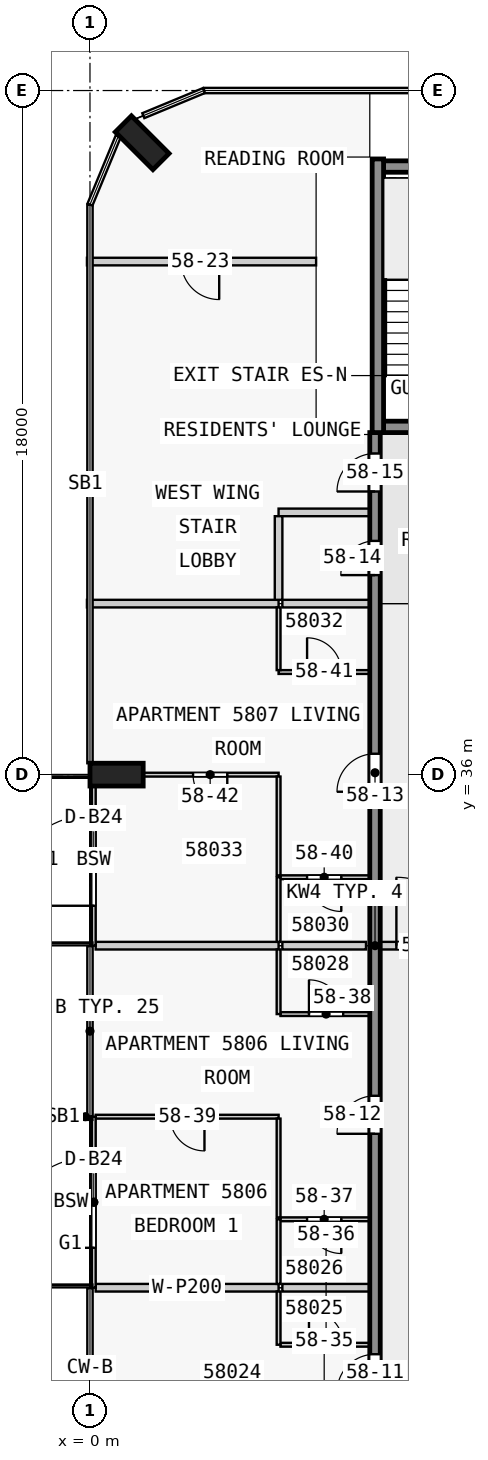
"""IFC4 building model, lengths in metres.
Left out: names, types, materials, properties, quantities, classifications, styles, units other than length and angle.
Written with IfcOpenShell. Run it as: python <this file> out.ifc"""

import sys

from ifc_helpers import new_model, si_unit, direction, frame, frame_2d, origin, origin_2d, place, context, subcontext, project, spatial, rectangle, extrude, element, fill, save


model = new_model("IFC4")
c1 = context("Model", 3, precision=1e-05, world=origin(), true_north=direction((0.0, 1.0)))
c2 = subcontext(c1, "Body", "Model", "MODEL_VIEW")
j1 = project(units=[si_unit("LENGTHUNIT", "METRE"), si_unit("PLANEANGLEUNIT", "RADIAN")], contexts=[c1])
p1 = place(None, origin())
s1 = spatial("IfcSite", under=j1, at=p1, CompositionType="ELEMENT")
p2 = place(p1, origin())
s2 = spatial("IfcBuilding", under=s1, at=p2, CompositionType="ELEMENT")
p3 = place(p2, frame((0.0, 0.0, 222.4)))
s3 = spatial("IfcBuildingStorey", under=s2, at=p3, CompositionType="ELEMENT", Elevation=222.4)
for number, where, z_axis, x_axis in (
    (1, (1.374, 52.626, 0.0), (0.0, 0.0, 1.0), (0.707, 0.707, 0.0)),
    (2, (0.7, 36.0, 0.0), (0.0, 0.0, 1.0), (0.0, 1.0, 0.0)),
):
    element("IfcColumn", number, at=place(p3, frame(where, z_axis=z_axis, x_axis=x_axis)), inside=s3, PredefinedType="COLUMN", context=c2, shape_type="SweptSolid", body=[
        extrude(rectangle(XDim=0.6, YDim=1.4, at=origin_2d()), origin(), (0.0, 0.0, 1.0), 3.5),
    ])
p4 = place(p3, frame((7.725, 45.15, 0.0), z_axis=(0.0, 0.0, 1.0), x_axis=(1.0, 0.0, 0.0)))
e3 = element("IfcWall", 3, at=p4, inside=s3, PredefinedType="SHEAR", context=c2, shape_type="SweptSolid", body=[
    extrude(rectangle(XDim=2.55, YDim=0.3, at=frame_2d((1.275, 0.0))), origin(), (0.0, 0.0, 1.0), 3.5),
])
p5 = place(p4, frame((0.725, 0.0, 0.0)))
e4 = element("IfcOpeningElement", 4, at=p5, cuts=e3, PredefinedType="OPENING", context=c2, shape_type="SweptSolid", body=[
    extrude(rectangle(XDim=1.1, YDim=2.1, at=frame_2d((0.55, 1.05))), frame((0.0, 0.16, 0.0), z_axis=(0.0, -1.0, 0.0), x_axis=(1.0, 0.0, 0.0)), (0.0, 0.0, 1.0), 0.32),
])
p6 = place(p3, frame((7.725, 52.0, 0.0), z_axis=(0.0, 0.0, 1.0), x_axis=(1.0, 0.0, 0.0)))
e5 = element("IfcWall", 5, at=p6, inside=s3, PredefinedType="SHEAR", context=c2, shape_type="SweptSolid", body=[
    extrude(rectangle(XDim=2.55, YDim=0.3, at=frame_2d((1.275, 0.0))), origin(), (0.0, 0.0, 1.0), 3.5),
])
p7 = place(p3, frame((7.575, 45.0, 0.0), z_axis=(0.0, 0.0, 1.0), x_axis=(0.0, 1.0, 0.0)))
e6 = element("IfcWall", 6, at=p7, inside=s3, PredefinedType="SHEAR", context=c2, shape_type="SweptSolid", body=[
    extrude(rectangle(XDim=7.2, YDim=0.3, at=frame_2d((3.6, 0.0))), origin(), (0.0, 0.0, 1.0), 3.5),
])
p8 = place(p3, frame((7.5, 18.0, 0.0), z_axis=(0.0, 0.0, 1.0), x_axis=(0.0, 1.0, 0.0)))
e7 = element("IfcWall", 7, at=p8, inside=s3, PredefinedType="SHEAR", context=c2, shape_type="SweptSolid", body=[
    extrude(rectangle(XDim=27.0, YDim=0.275, at=frame_2d((13.5, 0.0))), origin(), (0.0, 0.0, 1.0), 3.25),
])
p9 = place(p8, frame((1.75, 0.0, 0.0)))
e8 = element("IfcOpeningElement", 8, at=p9, cuts=e7, PredefinedType="OPENING", context=c2, shape_type="SweptSolid", body=[
    extrude(rectangle(XDim=1.0, YDim=2.1, at=frame_2d((0.5, 1.05))), frame((0.0, 0.147, 0.0), z_axis=(0.0, -1.0, 0.0), x_axis=(1.0, 0.0, 0.0)), (0.0, 0.0, 1.0), 0.295),
])
p10 = place(p8, frame((8.55, 0.0, 0.0)))
e9 = element("IfcOpeningElement", 9, at=p10, cuts=e7, PredefinedType="OPENING", context=c2, shape_type="SweptSolid", body=[
    extrude(rectangle(XDim=1.0, YDim=2.1, at=frame_2d((0.5, 1.05))), frame((0.0, 0.147, 0.0), z_axis=(0.0, -1.0, 0.0), x_axis=(1.0, 0.0, 0.0)), (0.0, 0.0, 1.0), 0.295),
])
p11 = place(p8, frame((17.55, 0.0, 0.0)))
e10 = element("IfcOpeningElement", 10, at=p11, cuts=e7, PredefinedType="OPENING", context=c2, shape_type="SweptSolid", body=[
    extrude(rectangle(XDim=1.0, YDim=2.1, at=frame_2d((0.5, 1.05))), frame((0.0, 0.147, 0.0), z_axis=(0.0, -1.0, 0.0), x_axis=(1.0, 0.0, 0.0)), (0.0, 0.0, 1.0), 0.295),
])
p12 = place(p8, frame((23.25, 0.0, 0.0)))
e11 = element("IfcOpeningElement", 11, at=p12, cuts=e7, PredefinedType="OPENING", context=c2, shape_type="SweptSolid", body=[
    extrude(rectangle(XDim=0.9, YDim=2.1, at=frame_2d((0.45, 1.05))), frame((0.0, 0.147, 0.0), z_axis=(0.0, -1.0, 0.0), x_axis=(1.0, 0.0, 0.0)), (0.0, 0.0, 1.0), 0.295),
])
p13 = place(p8, frame((25.45, 0.0, 0.0)))
e12 = element("IfcOpeningElement", 12, at=p13, cuts=e7, PredefinedType="OPENING", context=c2, shape_type="SweptSolid", body=[
    extrude(rectangle(XDim=1.0, YDim=2.1, at=frame_2d((0.5, 1.05))), frame((0.0, 0.147, 0.0), z_axis=(0.0, -1.0, 0.0), x_axis=(1.0, 0.0, 0.0)), (0.0, 0.0, 1.0), 0.295),
])
p14 = place(p3, frame((0.1, 22.5, 0.0), z_axis=(0.0, 0.0, 1.0), x_axis=(0.0, 1.0, 0.0)))
e13 = element("IfcWall", 13, at=p14, inside=s3, PredefinedType="STANDARD", context=c2, shape_type="SweptSolid", body=[
    extrude(rectangle(XDim=4.5, YDim=0.1, at=frame_2d((2.25, 0.0))), origin(), (0.0, 0.0, 1.0), 3.25),
])
p15 = place(p14, frame((1.05, 0.0, 0.0)))
e14 = element("IfcOpeningElement", 14, at=p15, cuts=e13, PredefinedType="OPENING", context=c2, shape_type="SweptSolid", body=[
    extrude(rectangle(XDim=2.4, YDim=2.4, at=frame_2d((1.2, 1.2))), frame((0.0, 0.06, 0.0), z_axis=(0.0, -1.0, 0.0), x_axis=(1.0, 0.0, 0.0)), (0.0, 0.0, 1.0), 0.12),
])
p16 = place(p3, frame((0.1, 31.5, 0.0), z_axis=(0.0, 0.0, 1.0), x_axis=(0.0, 1.0, 0.0)))
e15 = element("IfcWall", 15, at=p16, inside=s3, PredefinedType="STANDARD", context=c2, shape_type="SweptSolid", body=[
    extrude(rectangle(XDim=4.5, YDim=0.1, at=frame_2d((2.25, 0.0))), origin(), (0.0, 0.0, 1.0), 3.25),
])
p17 = place(p16, frame((1.05, 0.0, 0.0)))
e16 = element("IfcOpeningElement", 16, at=p17, cuts=e15, PredefinedType="OPENING", context=c2, shape_type="SweptSolid", body=[
    extrude(rectangle(XDim=2.4, YDim=2.4, at=frame_2d((1.2, 1.2))), frame((0.0, 0.06, 0.0), z_axis=(0.0, -1.0, 0.0), x_axis=(1.0, 0.0, 0.0)), (0.0, 0.0, 1.0), 0.12),
])
p18 = place(p3, frame((5.012, 21.0, 0.0), z_axis=(0.0, 0.0, 1.0), x_axis=(1.0, 0.0, 0.0)))
e17 = element("IfcWall", 17, at=p18, inside=s3, PredefinedType="PARTITIONING", context=c2, shape_type="SweptSolid", body=[
    extrude(rectangle(XDim=2.35, YDim=0.1, at=frame_2d((1.175, 0.0))), origin(), (0.0, 0.0, 1.0), 3.25),
])
p19 = place(p18, frame((0.75, 0.0, 0.0)))
e18 = element("IfcOpeningElement", 18, at=p19, cuts=e17, PredefinedType="OPENING", context=c2, shape_type="SweptSolid", body=[
    extrude(rectangle(XDim=0.9, YDim=2.1, at=frame_2d((0.45, 1.05))), frame((0.0, 0.06, 0.0), z_axis=(0.0, -1.0, 0.0), x_axis=(1.0, 0.0, 0.0)), (0.0, 0.0, 1.0), 0.12),
])
p20 = place(p3, frame((7.363, 22.5, 0.0), z_axis=(0.0, 0.0, 1.0), x_axis=(-1.0, 0.0, 0.0)))
e19 = element("IfcWall", 19, at=p20, inside=s3, PredefinedType="PARTITIONING", context=c2, shape_type="SweptSolid", body=[
    extrude(rectangle(XDim=2.3, YDim=0.2, at=frame_2d((1.15, 0.0))), origin(), (0.0, 0.0, 1.0), 3.25),
])
p21 = place(p3, frame((0.15, 22.5, 0.0), z_axis=(0.0, 0.0, 1.0), x_axis=(1.0, 0.0, 0.0)))
e20 = element("IfcWall", 20, at=p21, inside=s3, PredefinedType="PARTITIONING", context=c2, shape_type="SweptSolid", body=[
    extrude(rectangle(XDim=4.812, YDim=0.2, at=frame_2d((2.406, 0.0))), origin(), (0.0, 0.0, 1.0), 3.25),
])
p22 = place(p3, frame((7.363, 24.3, 0.0), z_axis=(0.0, 0.0, 1.0), x_axis=(-1.0, 0.0, 0.0)))
e21 = element("IfcWall", 21, at=p22, inside=s3, PredefinedType="PARTITIONING", context=c2, shape_type="SweptSolid", body=[
    extrude(rectangle(XDim=2.35, YDim=0.1, at=frame_2d((1.175, 0.0))), origin(), (0.0, 0.0, 1.0), 3.25),
])
p23 = place(p22, frame((0.75, 0.0, 0.0)))
e22 = element("IfcOpeningElement", 22, at=p23, cuts=e21, PredefinedType="OPENING", context=c2, shape_type="SweptSolid", body=[
    extrude(rectangle(XDim=0.9, YDim=2.1, at=frame_2d((0.45, 1.05))), frame((0.0, 0.06, 0.0), z_axis=(0.0, -1.0, 0.0), x_axis=(1.0, 0.0, 0.0)), (0.0, 0.0, 1.0), 0.12),
])
p24 = place(p3, frame((4.962, 27.0, 0.0), z_axis=(0.0, 0.0, 1.0), x_axis=(-1.0, 0.0, 0.0)))
e23 = element("IfcWall", 23, at=p24, inside=s3, PredefinedType="PARTITIONING", context=c2, shape_type="SweptSolid", body=[
    extrude(rectangle(XDim=4.812, YDim=0.1, at=frame_2d((2.406, 0.0))), origin(), (0.0, 0.0, 1.0), 3.25),
])
p25 = place(p24, frame((1.95, 0.0, 0.0)))
e24 = element("IfcOpeningElement", 24, at=p25, cuts=e23, PredefinedType="OPENING", context=c2, shape_type="SweptSolid", body=[
    extrude(rectangle(XDim=0.9, YDim=2.1, at=frame_2d((0.45, 1.05))), frame((0.0, 0.06, 0.0), z_axis=(0.0, -1.0, 0.0), x_axis=(1.0, 0.0, 0.0)), (0.0, 0.0, 1.0), 0.12),
])
p26 = place(p3, frame((5.012, 29.7, 0.0), z_axis=(0.0, 0.0, 1.0), x_axis=(1.0, 0.0, 0.0)))
e25 = element("IfcWall", 25, at=p26, inside=s3, PredefinedType="PARTITIONING", context=c2, shape_type="SweptSolid", body=[
    extrude(rectangle(XDim=2.35, YDim=0.1, at=frame_2d((1.175, 0.0))), origin(), (0.0, 0.0, 1.0), 3.25),
])
p27 = place(p26, frame((0.75, 0.0, 0.0)))
e26 = element("IfcOpeningElement", 26, at=p27, cuts=e25, PredefinedType="OPENING", context=c2, shape_type="SweptSolid", body=[
    extrude(rectangle(XDim=0.9, YDim=2.1, at=frame_2d((0.45, 1.05))), frame((0.0, 0.06, 0.0), z_axis=(0.0, -1.0, 0.0), x_axis=(1.0, 0.0, 0.0)), (0.0, 0.0, 1.0), 0.12),
])
p28 = place(p3, frame((7.262, 31.5, 0.0), z_axis=(0.0, 0.0, 1.0), x_axis=(-1.0, 0.0, 0.0)))
e27 = element("IfcWall", 27, at=p28, inside=s3, PredefinedType="PARTITIONING", context=c2, shape_type="SweptSolid", body=[
    extrude(rectangle(XDim=2.2, YDim=0.2, at=frame_2d((1.1, 0.0))), origin(), (0.0, 0.0, 1.0), 3.25),
])
p29 = place(p3, frame((0.15, 31.5, 0.0), z_axis=(0.0, 0.0, 1.0), x_axis=(1.0, 0.0, 0.0)))
e28 = element("IfcWall", 28, at=p29, inside=s3, PredefinedType="PARTITIONING", context=c2, shape_type="SweptSolid", body=[
    extrude(rectangle(XDim=4.812, YDim=0.2, at=frame_2d((2.406, 0.0))), origin(), (0.0, 0.0, 1.0), 3.25),
])
p30 = place(p3, frame((7.363, 33.3, 0.0), z_axis=(0.0, 0.0, 1.0), x_axis=(-1.0, 0.0, 0.0)))
e29 = element("IfcWall", 29, at=p30, inside=s3, PredefinedType="PARTITIONING", context=c2, shape_type="SweptSolid", body=[
    extrude(rectangle(XDim=2.35, YDim=0.1, at=frame_2d((1.175, 0.0))), origin(), (0.0, 0.0, 1.0), 3.25),
])
p31 = place(p30, frame((0.75, 0.0, 0.0)))
e30 = element("IfcOpeningElement", 30, at=p31, cuts=e29, PredefinedType="OPENING", context=c2, shape_type="SweptSolid", body=[
    extrude(rectangle(XDim=0.9, YDim=2.1, at=frame_2d((0.45, 1.05))), frame((0.0, 0.06, 0.0), z_axis=(0.0, -1.0, 0.0), x_axis=(1.0, 0.0, 0.0)), (0.0, 0.0, 1.0), 0.12),
])
p32 = place(p3, frame((4.962, 36.0, 0.0), z_axis=(0.0, 0.0, 1.0), x_axis=(-1.0, 0.0, 0.0)))
e31 = element("IfcWall", 31, at=p32, inside=s3, PredefinedType="PARTITIONING", context=c2, shape_type="SweptSolid", body=[
    extrude(rectangle(XDim=3.562, YDim=0.1, at=frame_2d((1.781, 0.0))), origin(), (0.0, 0.0, 1.0), 3.25),
])
p33 = place(p32, frame((1.35, 0.0, 0.0)))
e32 = element("IfcOpeningElement", 32, at=p33, cuts=e31, PredefinedType="OPENING", context=c2, shape_type="SweptSolid", body=[
    extrude(rectangle(XDim=0.9, YDim=2.1, at=frame_2d((0.45, 1.05))), frame((0.0, 0.06, 0.0), z_axis=(0.0, -1.0, 0.0), x_axis=(1.0, 0.0, 0.0)), (0.0, 0.0, 1.0), 0.12),
])
p34 = place(p3, frame((4.962, 38.7, 0.0), z_axis=(0.0, 0.0, 1.0), x_axis=(1.0, 0.0, 0.0)))
e33 = element("IfcWall", 33, at=p34, inside=s3, PredefinedType="PARTITIONING", context=c2, shape_type="SweptSolid", body=[
    extrude(rectangle(XDim=2.4, YDim=0.1, at=frame_2d((1.2, 0.0))), origin(), (0.0, 0.0, 1.0), 3.25),
])
p35 = place(p34, frame((0.75, 0.0, 0.0)))
e34 = element("IfcOpeningElement", 34, at=p35, cuts=e33, PredefinedType="OPENING", context=c2, shape_type="SweptSolid", body=[
    extrude(rectangle(XDim=0.9, YDim=2.1, at=frame_2d((0.45, 1.05))), frame((0.0, 0.06, 0.0), z_axis=(0.0, -1.0, 0.0), x_axis=(1.0, 0.0, 0.0)), (0.0, 0.0, 1.0), 0.12),
])
p36 = place(p3, frame((7.363, 40.5, 0.0), z_axis=(0.0, 0.0, 1.0), x_axis=(-1.0, 0.0, 0.0)))
e35 = element("IfcWall", 35, at=p36, inside=s3, PredefinedType="PARTITIONING", context=c2, shape_type="SweptSolid", body=[
    extrude(rectangle(XDim=2.3, YDim=0.2, at=frame_2d((1.15, 0.0))), origin(), (0.0, 0.0, 1.0), 3.25),
])
p37 = place(p3, frame((-0.08, 40.5, 0.0), z_axis=(0.0, 0.0, 1.0), x_axis=(1.0, 0.0, 0.0)))
e36 = element("IfcWall", 36, at=p37, inside=s3, PredefinedType="PARTITIONING", context=c2, shape_type="SweptSolid", body=[
    extrude(rectangle(XDim=5.042, YDim=0.2, at=frame_2d((2.521, 0.0))), origin(), (0.0, 0.0, 1.0), 3.25),
])
p38 = place(p3, frame((7.363, 42.9, 0.0), z_axis=(0.0, 0.0, 1.0), x_axis=(-1.0, 0.0, 0.0)))
e37 = element("IfcWall", 37, at=p38, inside=s3, PredefinedType="PARTITIONING", context=c2, shape_type="SweptSolid", body=[
    extrude(rectangle(XDim=2.4, YDim=0.2, at=frame_2d((1.2, 0.0))), origin(), (0.0, 0.0, 1.0), 3.25),
])
p39 = place(p3, frame((5.95, 49.5, 0.0), z_axis=(0.0, 0.0, 1.0), x_axis=(-1.0, 0.0, 0.0)))
e38 = element("IfcWall", 38, at=p39, inside=s3, PredefinedType="PARTITIONING", context=c2, shape_type="SweptSolid", body=[
    extrude(rectangle(XDim=6.03, YDim=0.2, at=frame_2d((3.015, 0.0))), origin(), (0.0, 0.0, 1.0), 3.25),
])
p40 = place(p39, frame((2.55, 0.0, 0.0)))
e39 = element("IfcOpeningElement", 39, at=p40, cuts=e38, PredefinedType="OPENING", context=c2, shape_type="SweptSolid", body=[
    extrude(rectangle(XDim=1.0, YDim=2.1, at=frame_2d((0.5, 1.05))), frame((0.0, 0.11, 0.0), z_axis=(0.0, -1.0, 0.0), x_axis=(1.0, 0.0, 0.0)), (0.0, 0.0, 1.0), 0.22),
])
p41 = place(p3, frame((4.962, 22.4, 0.0), z_axis=(0.0, 0.0, 1.0), x_axis=(0.0, -1.0, 0.0)))
e40 = element("IfcWall", 40, at=p41, inside=s3, PredefinedType="PARTITIONING", context=c2, shape_type="SweptSolid", body=[
    extrude(rectangle(XDim=1.4, YDim=0.1, at=frame_2d((0.7, 0.0))), origin(), (0.0, 0.0, 1.0), 3.25),
])
for number, where, z_axis, x_axis in (
    (41, (4.962, 24.3, 0.0), (0.0, 0.0, 1.0), (0.0, -1.0, 0.0)),
    (42, (4.962, 31.4, 0.0), (0.0, 0.0, 1.0), (0.0, -1.0, 0.0)),
    (43, (4.962, 33.3, 0.0), (0.0, 0.0, 1.0), (0.0, -1.0, 0.0)),
):
    element("IfcWall", number, at=place(p3, frame(where, z_axis=z_axis, x_axis=x_axis)), inside=s3, PredefinedType="PARTITIONING", context=c2, shape_type="SweptSolid", body=[
        extrude(rectangle(XDim=1.7, YDim=0.1, at=frame_2d((0.85, 0.0))), origin(), (0.0, 0.0, 1.0), 3.25),
    ])
p42 = place(p3, frame((4.962, 40.4, 0.0), z_axis=(0.0, 0.0, 1.0), x_axis=(0.0, -1.0, 0.0)))
e44 = element("IfcWall", 44, at=p42, inside=s3, PredefinedType="PARTITIONING", context=c2, shape_type="SweptSolid", body=[
    extrude(rectangle(XDim=1.65, YDim=0.1, at=frame_2d((0.825, 0.0))), origin(), (0.0, 0.0, 1.0), 3.25),
])
for number, where, z_axis, x_axis in (
    (45, (4.962, 24.35, 0.0), (0.0, 0.0, 1.0), (0.0, 1.0, 0.0)),
    (46, (4.962, 33.35, 0.0), (0.0, 0.0, 1.0), (0.0, 1.0, 0.0)),
):
    element("IfcWall", number, at=place(p3, frame(where, z_axis=z_axis, x_axis=x_axis)), inside=s3, PredefinedType="PARTITIONING", context=c2, shape_type="SweptSolid", body=[
        extrude(rectangle(XDim=2.6, YDim=0.1, at=frame_2d((1.3, 0.0))), origin(), (0.0, 0.0, 1.0), 3.25),
    ])
p43 = place(p3, frame((4.962, 42.8, 0.0), z_axis=(0.0, 0.0, 1.0), x_axis=(0.0, -1.0, 0.0)))
e47 = element("IfcWall", 47, at=p43, inside=s3, PredefinedType="PARTITIONING", context=c2, shape_type="SweptSolid", body=[
    extrude(rectangle(XDim=2.2, YDim=0.2, at=frame_2d((1.1, 0.0))), origin(), (0.0, 0.0, 1.0), 3.25),
])
p44 = place(p3, frame((7.363, 31.5, 0.0), z_axis=(0.0, 0.0, 1.0), x_axis=(1.0, 0.0, 0.0)))
e48 = element("IfcWall", 48, at=p44, inside=s3, PredefinedType="PARTITIONING", context=c2, shape_type="SweptSolid", body=[
    extrude(rectangle(XDim=3.175, YDim=0.2, at=frame_2d((1.587, 0.0))), origin(), (0.0, 0.0, 1.0), 3.25),
])
p45 = place(p44, frame((0.7, 0.0, 0.0)))
e49 = element("IfcOpeningElement", 49, at=p45, cuts=e48, PredefinedType="OPENING", context=c2, shape_type="SweptSolid", body=[
    extrude(rectangle(XDim=1.8, YDim=2.1, at=frame_2d((0.9, 1.05))), frame((0.0, 0.11, 0.0), z_axis=(0.0, -1.0, 0.0), x_axis=(1.0, 0.0, 0.0)), (0.0, 0.0, 1.0), 0.22),
])
p46 = place(p15, origin())
e50 = element("IfcDoor", 50, at=p46, inside=s3, OperationType="SINGLE_SWING_LEFT", PredefinedType="DOOR", context=c2, shape_type="SweptSolid", body=[
    extrude(rectangle(XDim=2.4, YDim=2.4, at=frame_2d((1.2, 1.2))), frame((0.0, 0.025, 0.0), z_axis=(0.0, -1.0, 0.0), x_axis=(1.0, 0.0, 0.0)), (0.0, 0.0, 1.0), 0.05),
])
fill(e14, e50)
p47 = place(p17, origin())
e51 = element("IfcDoor", 51, at=p47, inside=s3, OperationType="SINGLE_SWING_LEFT", PredefinedType="DOOR", context=c2, shape_type="SweptSolid", body=[
    extrude(rectangle(XDim=2.4, YDim=2.4, at=frame_2d((1.2, 1.2))), frame((0.0, 0.025, 0.0), z_axis=(0.0, -1.0, 0.0), x_axis=(1.0, 0.0, 0.0)), (0.0, 0.0, 1.0), 0.05),
])
fill(e16, e51)
p48 = place(p9, origin())
e52 = element("IfcDoor", 52, at=p48, inside=s3, OperationType="SINGLE_SWING_LEFT", PredefinedType="DOOR", context=c2, shape_type="SweptSolid", body=[
    extrude(rectangle(XDim=1.0, YDim=2.1, at=frame_2d((0.5, 1.05))), frame((0.0, 0.025, 0.0), z_axis=(0.0, -1.0, 0.0), x_axis=(1.0, 0.0, 0.0)), (0.0, 0.0, 1.0), 0.05),
])
fill(e8, e52)
p49 = place(p10, origin())
e53 = element("IfcDoor", 53, at=p49, inside=s3, OperationType="SINGLE_SWING_LEFT", PredefinedType="DOOR", context=c2, shape_type="SweptSolid", body=[
    extrude(rectangle(XDim=1.0, YDim=2.1, at=frame_2d((0.5, 1.05))), frame((0.0, 0.025, 0.0), z_axis=(0.0, -1.0, 0.0), x_axis=(1.0, 0.0, 0.0)), (0.0, 0.0, 1.0), 0.05),
])
fill(e9, e53)
p50 = place(p11, origin())
e54 = element("IfcDoor", 54, at=p50, inside=s3, OperationType="SINGLE_SWING_RIGHT", PredefinedType="DOOR", context=c2, shape_type="SweptSolid", body=[
    extrude(rectangle(XDim=1.0, YDim=2.1, at=frame_2d((0.5, 1.05))), frame((0.0, 0.025, 0.0), z_axis=(0.0, -1.0, 0.0), x_axis=(1.0, 0.0, 0.0)), (0.0, 0.0, 1.0), 0.05),
])
fill(e10, e54)
p51 = place(p12, origin())
e55 = element("IfcDoor", 55, at=p51, inside=s3, OperationType="SINGLE_SWING_RIGHT", PredefinedType="DOOR", context=c2, shape_type="SweptSolid", body=[
    extrude(rectangle(XDim=0.9, YDim=2.1, at=frame_2d((0.45, 1.05))), frame((0.0, 0.025, 0.0), z_axis=(0.0, -1.0, 0.0), x_axis=(1.0, 0.0, 0.0)), (0.0, 0.0, 1.0), 0.05),
])
fill(e11, e55)
p52 = place(p13, origin())
e56 = element("IfcDoor", 56, at=p52, inside=s3, OperationType="SINGLE_SWING_RIGHT", PredefinedType="DOOR", context=c2, shape_type="SweptSolid", body=[
    extrude(rectangle(XDim=1.0, YDim=2.1, at=frame_2d((0.5, 1.05))), frame((0.0, 0.025, 0.0), z_axis=(0.0, -1.0, 0.0), x_axis=(1.0, 0.0, 0.0)), (0.0, 0.0, 1.0), 0.05),
])
fill(e12, e56)
p53 = place(p45, origin())
e57 = element("IfcDoor", 57, at=p53, inside=s3, OperationType="SINGLE_SWING_RIGHT", PredefinedType="DOOR", context=c2, shape_type="SweptSolid", body=[
    extrude(rectangle(XDim=1.8, YDim=2.1, at=frame_2d((0.9, 1.05))), frame((0.0, 0.025, 0.0), z_axis=(0.0, -1.0, 0.0), x_axis=(1.0, 0.0, 0.0)), (0.0, 0.0, 1.0), 0.05),
])
fill(e49, e57)
p54 = place(p40, origin())
e58 = element("IfcDoor", 58, at=p54, inside=s3, OperationType="SINGLE_SWING_RIGHT", PredefinedType="DOOR", context=c2, shape_type="SweptSolid", body=[
    extrude(rectangle(XDim=1.0, YDim=2.1, at=frame_2d((0.5, 1.05))), frame((0.0, 0.025, 0.0), z_axis=(0.0, -1.0, 0.0), x_axis=(1.0, 0.0, 0.0)), (0.0, 0.0, 1.0), 0.05),
])
fill(e39, e58)
p55 = place(p19, origin())
e59 = element("IfcDoor", 59, at=p55, inside=s3, OperationType="SINGLE_SWING_RIGHT", PredefinedType="DOOR", context=c2, shape_type="SweptSolid", body=[
    extrude(rectangle(XDim=0.9, YDim=2.1, at=frame_2d((0.45, 1.05))), frame((0.0, 0.025, 0.0), z_axis=(0.0, -1.0, 0.0), x_axis=(1.0, 0.0, 0.0)), (0.0, 0.0, 1.0), 0.05),
])
fill(e18, e59)
p56 = place(p23, origin())
e60 = element("IfcDoor", 60, at=p56, inside=s3, OperationType="SINGLE_SWING_RIGHT", PredefinedType="DOOR", context=c2, shape_type="SweptSolid", body=[
    extrude(rectangle(XDim=0.9, YDim=2.1, at=frame_2d((0.45, 1.05))), frame((0.0, 0.025, 0.0), z_axis=(0.0, -1.0, 0.0), x_axis=(1.0, 0.0, 0.0)), (0.0, 0.0, 1.0), 0.05),
])
fill(e22, e60)
p57 = place(p27, origin())
e61 = element("IfcDoor", 61, at=p57, inside=s3, OperationType="SINGLE_SWING_RIGHT", PredefinedType="DOOR", context=c2, shape_type="SweptSolid", body=[
    extrude(rectangle(XDim=0.9, YDim=2.1, at=frame_2d((0.45, 1.05))), frame((0.0, 0.025, 0.0), z_axis=(0.0, -1.0, 0.0), x_axis=(1.0, 0.0, 0.0)), (0.0, 0.0, 1.0), 0.05),
])
fill(e26, e61)
p58 = place(p25, origin())
e62 = element("IfcDoor", 62, at=p58, inside=s3, OperationType="SINGLE_SWING_LEFT", PredefinedType="DOOR", context=c2, shape_type="SweptSolid", body=[
    extrude(rectangle(XDim=0.9, YDim=2.1, at=frame_2d((0.45, 1.05))), frame((0.0, 0.025, 0.0), z_axis=(0.0, -1.0, 0.0), x_axis=(1.0, 0.0, 0.0)), (0.0, 0.0, 1.0), 0.05),
])
fill(e24, e62)
p59 = place(p31, origin())
e63 = element("IfcDoor", 63, at=p59, inside=s3, OperationType="SINGLE_SWING_RIGHT", PredefinedType="DOOR", context=c2, shape_type="SweptSolid", body=[
    extrude(rectangle(XDim=0.9, YDim=2.1, at=frame_2d((0.45, 1.05))), frame((0.0, 0.025, 0.0), z_axis=(0.0, -1.0, 0.0), x_axis=(1.0, 0.0, 0.0)), (0.0, 0.0, 1.0), 0.05),
])
fill(e30, e63)
p60 = place(p35, origin())
e64 = element("IfcDoor", 64, at=p60, inside=s3, OperationType="SINGLE_SWING_RIGHT", PredefinedType="DOOR", context=c2, shape_type="SweptSolid", body=[
    extrude(rectangle(XDim=0.9, YDim=2.1, at=frame_2d((0.45, 1.05))), frame((0.0, 0.025, 0.0), z_axis=(0.0, -1.0, 0.0), x_axis=(1.0, 0.0, 0.0)), (0.0, 0.0, 1.0), 0.05),
])
fill(e34, e64)
p61 = place(p33, origin())
e65 = element("IfcDoor", 65, at=p61, inside=s3, OperationType="SINGLE_SWING_RIGHT", PredefinedType="DOOR", context=c2, shape_type="SweptSolid", body=[
    extrude(rectangle(XDim=0.9, YDim=2.1, at=frame_2d((0.45, 1.05))), frame((0.0, 0.025, 0.0), z_axis=(0.0, -1.0, 0.0), x_axis=(1.0, 0.0, 0.0)), (0.0, 0.0, 1.0), 0.05),
])
fill(e32, e65)
save(model, sys.argv[1])
